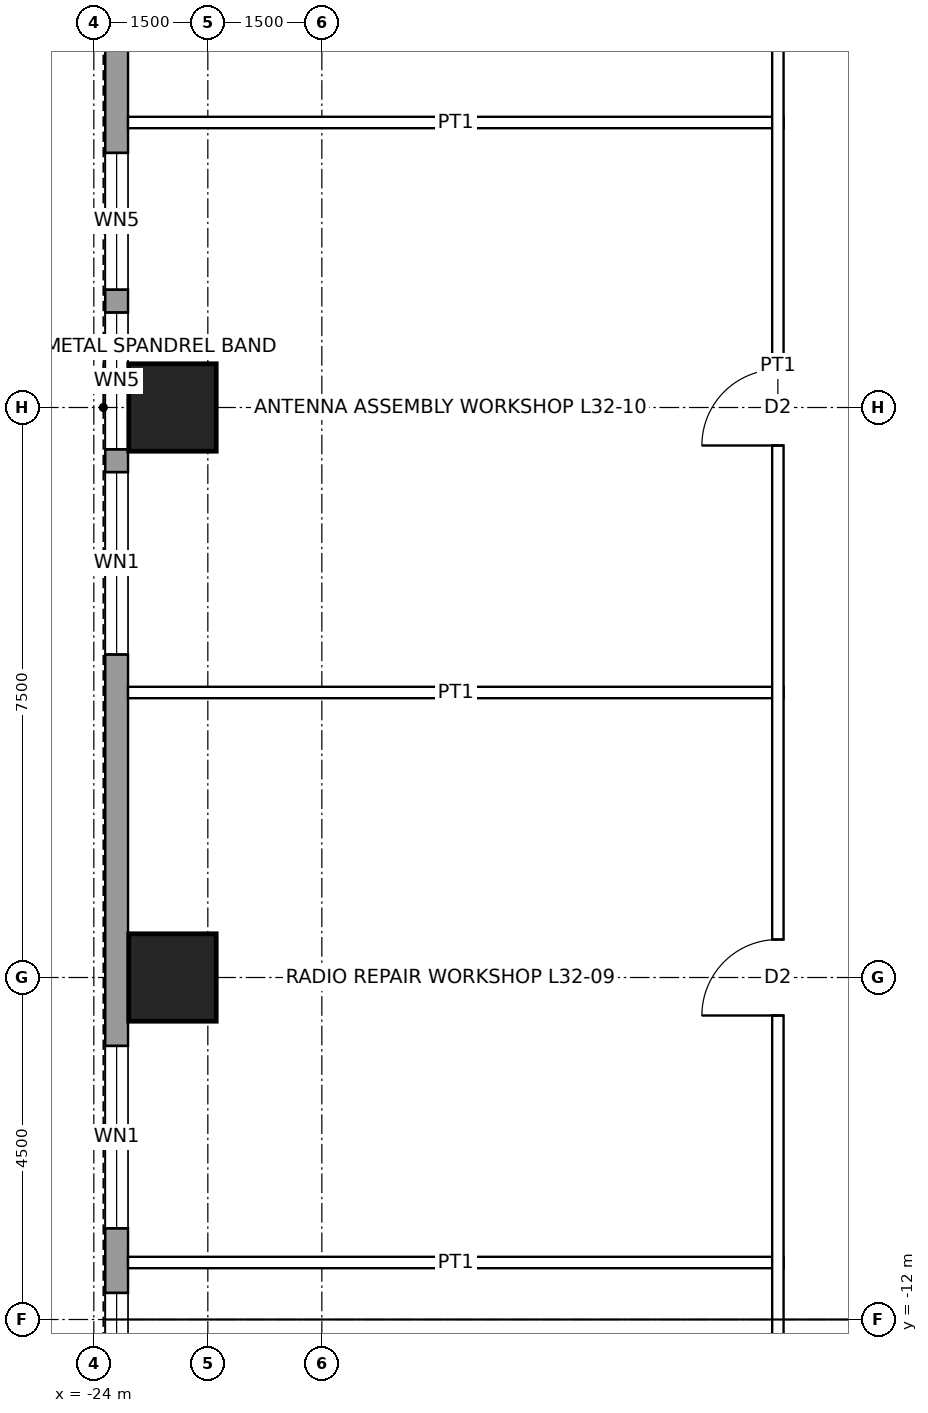
"""IFC4 building model, lengths in metres.
Left out: names, types, materials, properties, quantities, classifications, styles, units other than length and angle.
Written with IfcOpenShell. Run it as: python <this file> out.ifc"""

import sys

from ifc_helpers import new_model, si_unit, direction, frame, frame_2d, origin, origin_2d, place, context, subcontext, project, spatial, rectangle, hollow_rectangle, extrude, element, fill, save


model = new_model("IFC4")
c1 = context("Model", 3, precision=1e-05, world=origin(), true_north=direction((0.0, 1.0)))
c2 = subcontext(c1, "Body", "Model", "MODEL_VIEW")
j1 = project(units=[si_unit("LENGTHUNIT", "METRE"), si_unit("PLANEANGLEUNIT", "RADIAN")], contexts=[c1])
p1 = place(None, origin())
s1 = spatial("IfcSite", under=j1, at=p1, CompositionType="ELEMENT")
p2 = place(p1, origin())
s2 = spatial("IfcBuilding", under=s1, at=p2, CompositionType="ELEMENT")
p3 = place(p2, frame((0.0, 0.0, 158.4)))
s3 = spatial("IfcBuildingStorey", under=s2, at=p3, CompositionType="ELEMENT", Elevation=158.4)
for number, where, z_axis, x_axis in (
    (1, (-22.965, -7.5, 0.0), (0.0, 0.0, 1.0), (1.0, 0.0, 0.0)),
    (2, (-22.965, 0.0, 0.0), (0.0, 0.0, 1.0), (1.0, 0.0, 0.0)),
):
    element("IfcColumn", number, at=place(p3, frame(where, z_axis=z_axis, x_axis=x_axis)), inside=s3, PredefinedType="COLUMN", context=c2, shape_type="SweptSolid", body=[
        extrude(hollow_rectangle(XDim=1.15, YDim=1.15, WallThickness=0.075, at=origin_2d()), origin(), (0.0, 0.0, 1.0), 4.5),
    ])
p4 = place(p3, frame((-23.7, -16.2, 0.0), z_axis=(0.0, 0.0, 1.0), x_axis=(0.0, 1.0, 0.0)))
e3 = element("IfcWall", 3, at=p4, inside=s3, PredefinedType="SOLIDWALL", context=c2, shape_type="SweptSolid", body=[
    extrude(rectangle(XDim=32.4, YDim=0.3, at=frame_2d((16.2, 0.0))), origin(), (0.0, 0.0, 1.0), 4.3),
])
p5 = place(p4, frame((0.65, 0.0, 1.0)))
e4 = element("IfcOpeningElement", 4, at=p5, cuts=e3, PredefinedType="OPENING", context=c2, shape_type="SweptSolid", body=[
    extrude(rectangle(XDim=1.8, YDim=1.2, at=frame_2d((0.9, 0.6))), frame((0.0, 0.16, 0.0), z_axis=(0.0, -1.0, 0.0), x_axis=(1.0, 0.0, 0.0)), (0.0, 0.0, 1.0), 0.32),
])
p6 = place(p4, frame((2.75, 0.0, 1.0)))
e5 = element("IfcOpeningElement", 5, at=p6, cuts=e3, PredefinedType="OPENING", context=c2, shape_type="SweptSolid", body=[
    extrude(rectangle(XDim=1.8, YDim=1.2, at=frame_2d((0.9, 0.6))), frame((0.0, 0.16, 0.0), z_axis=(0.0, -1.0, 0.0), x_axis=(1.0, 0.0, 0.0)), (0.0, 0.0, 1.0), 0.32),
])
p7 = place(p4, frame((5.4, 0.0, 1.0)))
e6 = element("IfcOpeningElement", 6, at=p7, cuts=e3, PredefinedType="OPENING", context=c2, shape_type="SweptSolid", body=[
    extrude(rectangle(XDim=2.4, YDim=1.2, at=frame_2d((1.2, 0.6))), frame((0.0, 0.16, 0.0), z_axis=(0.0, -1.0, 0.0), x_axis=(1.0, 0.0, 0.0)), (0.0, 0.0, 1.0), 0.32),
])
p8 = place(p4, frame((12.95, 0.0, 1.0)))
e7 = element("IfcOpeningElement", 7, at=p8, cuts=e3, PredefinedType="OPENING", context=c2, shape_type="SweptSolid", body=[
    extrude(rectangle(XDim=2.4, YDim=1.2, at=frame_2d((1.2, 0.6))), frame((0.0, 0.16, 0.0), z_axis=(0.0, -1.0, 0.0), x_axis=(1.0, 0.0, 0.0)), (0.0, 0.0, 1.0), 0.32),
])
p9 = place(p4, frame((15.65, 0.0, 1.0)))
e8 = element("IfcOpeningElement", 8, at=p9, cuts=e3, PredefinedType="OPENING", context=c2, shape_type="SweptSolid", body=[
    extrude(rectangle(XDim=1.8, YDim=1.2, at=frame_2d((0.9, 0.6))), frame((0.0, 0.16, 0.0), z_axis=(0.0, -1.0, 0.0), x_axis=(1.0, 0.0, 0.0)), (0.0, 0.0, 1.0), 0.32),
])
p10 = place(p4, frame((17.75, 0.0, 1.0)))
e9 = element("IfcOpeningElement", 9, at=p10, cuts=e3, PredefinedType="OPENING", context=c2, shape_type="SweptSolid", body=[
    extrude(rectangle(XDim=1.8, YDim=1.2, at=frame_2d((0.9, 0.6))), frame((0.0, 0.16, 0.0), z_axis=(0.0, -1.0, 0.0), x_axis=(1.0, 0.0, 0.0)), (0.0, 0.0, 1.0), 0.32),
])
p11 = place(p4, frame((24.6, 0.0, 1.0)))
e10 = element("IfcOpeningElement", 10, at=p11, cuts=e3, PredefinedType="OPENING", context=c2, shape_type="SweptSolid", body=[
    extrude(rectangle(XDim=2.4, YDim=1.2, at=frame_2d((1.2, 0.6))), frame((0.0, 0.16, 0.0), z_axis=(0.0, -1.0, 0.0), x_axis=(1.0, 0.0, 0.0)), (0.0, 0.0, 1.0), 0.32),
])
p12 = place(p4, frame((28.0, 0.0, 1.0)))
e11 = element("IfcOpeningElement", 11, at=p12, cuts=e3, PredefinedType="OPENING", context=c2, shape_type="SweptSolid", body=[
    extrude(rectangle(XDim=2.4, YDim=1.2, at=frame_2d((1.2, 0.6))), frame((0.0, 0.16, 0.0), z_axis=(0.0, -1.0, 0.0), x_axis=(1.0, 0.0, 0.0)), (0.0, 0.0, 1.0), 0.32),
])
for number, where, z_axis, x_axis in (
    (12, (-23.55, -11.25, 0.0), (0.0, 0.0, 1.0), (1.0, 0.0, 0.0)),
    (13, (-23.55, -3.75, 0.0), (0.0, 0.0, 1.0), (1.0, 0.0, 0.0)),
    (14, (-23.55, 3.75, 0.0), (0.0, 0.0, 1.0), (1.0, 0.0, 0.0)),
):
    element("IfcWall", number, at=place(p3, frame(where, z_axis=z_axis, x_axis=x_axis)), inside=s3, PredefinedType="PARTITIONING", context=c2, shape_type="SweptSolid", body=[
        extrude(rectangle(XDim=8.625, YDim=0.15, at=frame_2d((4.312, 0.0))), origin(), (0.0, 0.0, 1.0), 3.431),
    ])
p13 = place(p3, frame((-15.0, -15.075, 0.0), z_axis=(0.0, 0.0, 1.0), x_axis=(0.0, 1.0, 0.0)))
e15 = element("IfcWall", 15, at=p13, inside=s3, PredefinedType="PARTITIONING", context=c2, shape_type="SweptSolid", body=[
    extrude(rectangle(XDim=30.15, YDim=0.15, at=frame_2d((15.075, 0.0))), origin(), (0.0, 0.0, 1.0), 4.3),
])
p14 = place(p13, frame((7.075, 0.0, 0.0)))
e16 = element("IfcOpeningElement", 16, at=p14, cuts=e15, PredefinedType="OPENING", context=c2, shape_type="SweptSolid", body=[
    extrude(rectangle(XDim=1.0, YDim=2.1, at=frame_2d((0.5, 1.05))), frame((0.0, 0.085, 0.0), z_axis=(0.0, -1.0, 0.0), x_axis=(1.0, 0.0, 0.0)), (0.0, 0.0, 1.0), 0.17),
])
p15 = place(p13, frame((14.575, 0.0, 0.0)))
e17 = element("IfcOpeningElement", 17, at=p15, cuts=e15, PredefinedType="OPENING", context=c2, shape_type="SweptSolid", body=[
    extrude(rectangle(XDim=1.0, YDim=2.1, at=frame_2d((0.5, 1.05))), frame((0.0, 0.085, 0.0), z_axis=(0.0, -1.0, 0.0), x_axis=(1.0, 0.0, 0.0)), (0.0, 0.0, 1.0), 0.17),
])
p16 = place(p13, frame((21.675, 0.0, 0.0)))
e18 = element("IfcOpeningElement", 18, at=p16, cuts=e15, PredefinedType="OPENING", context=c2, shape_type="SweptSolid", body=[
    extrude(rectangle(XDim=1.8, YDim=2.4, at=frame_2d((0.9, 1.2))), frame((0.0, 0.085, 0.0), z_axis=(0.0, -1.0, 0.0), x_axis=(1.0, 0.0, 0.0)), (0.0, 0.0, 1.0), 0.17),
])
p17 = place(p6, origin())
e19 = element("IfcWindow", 19, at=p17, inside=s3, PartitioningType="SINGLE_PANEL", PredefinedType="WINDOW", context=c2, shape_type="SweptSolid", body=[
    extrude(rectangle(XDim=1.8, YDim=1.2, at=frame_2d((0.9, 0.6))), frame((0.0, 0.03, 0.0), z_axis=(0.0, -1.0, 0.0), x_axis=(1.0, 0.0, 0.0)), (0.0, 0.0, 1.0), 0.06),
])
fill(e5, e19)
p18 = place(p7, origin())
e20 = element("IfcWindow", 20, at=p18, inside=s3, PartitioningType="SINGLE_PANEL", PredefinedType="WINDOW", context=c2, shape_type="SweptSolid", body=[
    extrude(rectangle(XDim=2.4, YDim=1.2, at=frame_2d((1.2, 0.6))), frame((0.0, 0.03, 0.0), z_axis=(0.0, -1.0, 0.0), x_axis=(1.0, 0.0, 0.0)), (0.0, 0.0, 1.0), 0.06),
])
fill(e6, e20)
p19 = place(p8, origin())
e21 = element("IfcWindow", 21, at=p19, inside=s3, PartitioningType="SINGLE_PANEL", PredefinedType="WINDOW", context=c2, shape_type="SweptSolid", body=[
    extrude(rectangle(XDim=2.4, YDim=1.2, at=frame_2d((1.2, 0.6))), frame((0.0, 0.03, 0.0), z_axis=(0.0, -1.0, 0.0), x_axis=(1.0, 0.0, 0.0)), (0.0, 0.0, 1.0), 0.06),
])
fill(e7, e21)
p20 = place(p9, origin())
e22 = element("IfcWindow", 22, at=p20, inside=s3, PartitioningType="SINGLE_PANEL", PredefinedType="WINDOW", context=c2, shape_type="SweptSolid", body=[
    extrude(rectangle(XDim=1.8, YDim=1.2, at=frame_2d((0.9, 0.6))), frame((0.0, 0.03, 0.0), z_axis=(0.0, -1.0, 0.0), x_axis=(1.0, 0.0, 0.0)), (0.0, 0.0, 1.0), 0.06),
])
fill(e8, e22)
p21 = place(p10, origin())
e23 = element("IfcWindow", 23, at=p21, inside=s3, PartitioningType="SINGLE_PANEL", PredefinedType="WINDOW", context=c2, shape_type="SweptSolid", body=[
    extrude(rectangle(XDim=1.8, YDim=1.2, at=frame_2d((0.9, 0.6))), frame((0.0, 0.03, 0.0), z_axis=(0.0, -1.0, 0.0), x_axis=(1.0, 0.0, 0.0)), (0.0, 0.0, 1.0), 0.06),
])
fill(e9, e23)
p22 = place(p14, origin())
e24 = element("IfcDoor", 24, at=p22, inside=s3, OperationType="SINGLE_SWING_LEFT", PredefinedType="DOOR", context=c2, shape_type="SweptSolid", body=[
    extrude(rectangle(XDim=1.0, YDim=2.1, at=frame_2d((0.5, 1.05))), frame((0.0, 0.025, 0.0), z_axis=(0.0, -1.0, 0.0), x_axis=(1.0, 0.0, 0.0)), (0.0, 0.0, 1.0), 0.05),
])
fill(e16, e24)
p23 = place(p15, origin())
e25 = element("IfcDoor", 25, at=p23, inside=s3, OperationType="SINGLE_SWING_LEFT", PredefinedType="DOOR", context=c2, shape_type="SweptSolid", body=[
    extrude(rectangle(XDim=1.0, YDim=2.1, at=frame_2d((0.5, 1.05))), frame((0.0, 0.025, 0.0), z_axis=(0.0, -1.0, 0.0), x_axis=(1.0, 0.0, 0.0)), (0.0, 0.0, 1.0), 0.05),
])
fill(e17, e25)
save(model, sys.argv[1])
